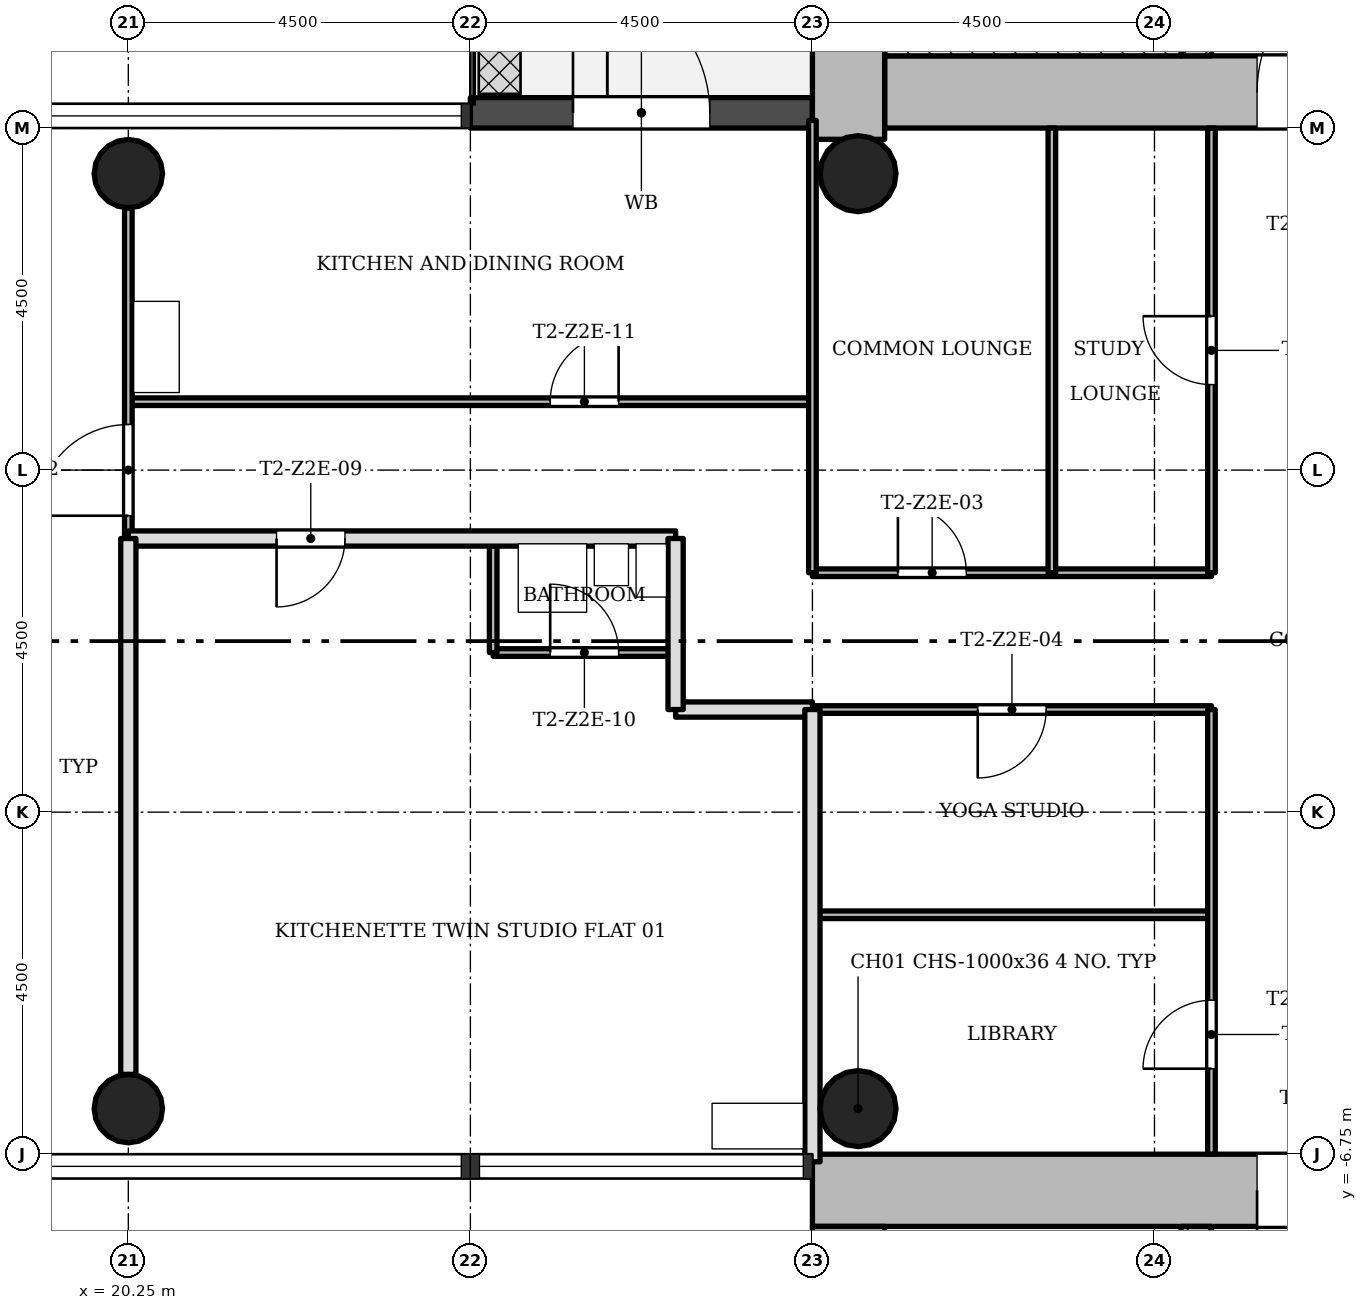
"""IFC4 building model, lengths in metres.
Left out: names, types, materials, properties, quantities, classifications, styles, units other than length and angle.
Written with IfcOpenShell. Run it as: python <this file> out.ifc"""

import sys

from ifc_helpers import new_model, si_unit, direction, frame, frame_2d, origin, origin_2d, place, context, subcontext, project, spatial, rectangle, hollow_circle, extrude, element, fill, save


model = new_model("IFC4")
c1 = context("Model", 3, precision=1e-05, world=origin(), true_north=direction((0.0, 1.0)))
c2 = subcontext(c1, "Body", "Model", "MODEL_VIEW")
j1 = project(units=[si_unit("LENGTHUNIT", "METRE"), si_unit("PLANEANGLEUNIT", "RADIAN")], contexts=[c1])
p1 = place(None, origin())
s1 = spatial("IfcSite", under=j1, at=p1, CompositionType="ELEMENT")
p2 = place(p1, origin())
s2 = spatial("IfcBuilding", under=s1, at=p2, CompositionType="ELEMENT")
p3 = place(p2, frame((0.0, 0.0, 103.8)))
s3 = spatial("IfcBuildingStorey", under=s2, at=p3, CompositionType="ELEMENT", Elevation=103.8)
p4 = place(p3, frame((30.2, 7.225, 0.0), z_axis=(0.0, 0.0, 1.0), x_axis=(1.0, 0.0, 0.0)))
e1 = element("IfcWall", 1, at=p4, inside=s3, PredefinedType="SHEAR", context=c2, shape_type="SweptSolid", body=[
    extrude(rectangle(XDim=12.55, YDim=0.95, at=frame_2d((6.275, 0.0))), origin(), (0.0, 0.0, 1.0), 3.4),
])
p5 = place(p4, frame((4.9, 0.0, 0.0)))
e2 = element("IfcOpeningElement", 2, at=p5, cuts=e1, PredefinedType="OPENING", context=c2, shape_type="SweptSolid", body=[
    extrude(rectangle(XDim=1.8, YDim=2.1, at=frame_2d((0.9, 1.05))), frame((0.0, 0.485, 0.0), z_axis=(0.0, -1.0, 0.0), x_axis=(1.0, 0.0, 0.0)), (0.0, 0.0, 1.0), 0.97),
])
p6 = place(p3, frame((29.725, 15.298, 0.0), z_axis=(0.0, 0.0, 1.0), x_axis=(0.0, -1.0, 0.0)))
e3 = element("IfcWall", 3, at=p6, inside=s3, PredefinedType="SHEAR", context=c2, shape_type="SweptSolid", body=[
    extrude(rectangle(XDim=8.696, YDim=0.95, at=frame_2d((4.348, 0.0))), origin(), (0.0, 0.0, 1.0), 3.4),
])
p7 = place(p3, frame((34.3, 7.7, 0.0), z_axis=(0.0, 0.0, 1.0), x_axis=(0.0, 1.0, 0.0)))
e4 = element("IfcWall", 4, at=p7, inside=s3, PredefinedType="SHEAR", context=c2, shape_type="SweptSolid", body=[
    extrude(rectangle(XDim=7.1, YDim=0.4, at=frame_2d((3.55, 0.0))), origin(), (0.0, 0.0, 1.0), 3.4),
])
p8 = place(p7, frame((0.7, 0.0, 0.0)))
e5 = element("IfcOpeningElement", 5, at=p8, cuts=e4, PredefinedType="OPENING", context=c2, shape_type="SweptSolid", body=[
    extrude(rectangle(XDim=0.9, YDim=2.1, at=frame_2d((0.45, 1.05))), frame((0.0, 0.21, 0.0), z_axis=(0.0, -1.0, 0.0), x_axis=(1.0, 0.0, 0.0)), (0.0, 0.0, 1.0), 0.42),
])
p9 = place(p3, frame((41.8, -7.225, 0.0), z_axis=(0.0, 0.0, 1.0), x_axis=(-1.0, 0.0, 0.0)))
e6 = element("IfcWall", 6, at=p9, inside=s3, PredefinedType="SHEAR", context=c2, shape_type="SweptSolid", body=[
    extrude(rectangle(XDim=12.55, YDim=0.95, at=frame_2d((6.275, 0.0))), origin(), (0.0, 0.0, 1.0), 3.4),
])
p10 = place(p9, frame((4.9, 0.0, 0.0)))
e7 = element("IfcOpeningElement", 7, at=p10, cuts=e6, PredefinedType="OPENING", context=c2, shape_type="SweptSolid", body=[
    extrude(rectangle(XDim=1.8, YDim=2.1, at=frame_2d((0.9, 1.05))), frame((0.0, 0.485, 0.0), z_axis=(0.0, -1.0, 0.0), x_axis=(1.0, 0.0, 0.0)), (0.0, 0.0, 1.0), 0.97),
])
p11 = place(p3, frame((29.725, -7.7, 0.0), z_axis=(0.0, 0.0, 1.0), x_axis=(0.0, -1.0, 0.0)))
e8 = element("IfcWall", 8, at=p11, inside=s3, PredefinedType="SHEAR", context=c2, shape_type="SweptSolid", body=[
    extrude(rectangle(XDim=8.05, YDim=0.95, at=frame_2d((4.025, 0.0))), origin(), (0.0, 0.0, 1.0), 3.4),
])
p12 = place(p3, frame((34.3, -14.8, 0.0), z_axis=(0.0, 0.0, 1.0), x_axis=(0.0, 1.0, 0.0)))
e9 = element("IfcWall", 9, at=p12, inside=s3, PredefinedType="SHEAR", context=c2, shape_type="SweptSolid", body=[
    extrude(rectangle(XDim=7.1, YDim=0.4, at=frame_2d((3.55, 0.0))), origin(), (0.0, 0.0, 1.0), 3.4),
])
p13 = place(p12, frame((5.2, 0.0, 0.0)))
e10 = element("IfcOpeningElement", 10, at=p13, cuts=e9, PredefinedType="OPENING", context=c2, shape_type="SweptSolid", body=[
    extrude(rectangle(XDim=1.1, YDim=2.1, at=frame_2d((0.55, 1.05))), frame((0.0, 0.21, 0.0), z_axis=(0.0, -1.0, 0.0), x_axis=(1.0, 0.0, 0.0)), (0.0, 0.0, 1.0), 0.42),
])
for number, where, z_axis, x_axis in (
    (11, (20.25, 6.15, 0.0), (0.0, 0.0, 1.0), (1.0, 0.0, 0.0)),
    (12, (20.25, -6.15, 0.0), (0.0, 0.0, 1.0), (1.0, 0.0, 0.0)),
):
    element("IfcColumn", number, at=place(p3, frame(where, z_axis=z_axis, x_axis=x_axis)), inside=s3, PredefinedType="COLUMN", context=c2, shape_type="SweptSolid", body=[
        extrude(hollow_circle(Radius=0.45, WallThickness=0.032, at=origin_2d()), origin(), (0.0, 0.0, 1.0), 3.4),
    ])
for number, where, z_axis, x_axis in (
    (13, (29.85, 6.15, 0.0), (0.0, 0.0, 1.0), (1.0, 0.0, 0.0)),
    (14, (29.85, -6.15, 0.0), (0.0, 0.0, 1.0), (1.0, 0.0, 0.0)),
):
    element("IfcColumn", number, at=place(p3, frame(where, z_axis=z_axis, x_axis=x_axis)), inside=s3, PredefinedType="COLUMN", context=c2, shape_type="SweptSolid", body=[
        extrude(hollow_circle(Radius=0.5, WallThickness=0.036, at=origin_2d()), origin(), (0.0, 0.0, 1.0), 3.4),
    ])
p14 = place(p3, frame((29.25, 6.95, -0.02), z_axis=(0.0, 0.0, 1.0), x_axis=(-1.0, 0.0, 0.0)))
e15 = element("IfcWall", 15, at=p14, inside=s3, PredefinedType="STANDARD", context=c2, shape_type="SweptSolid", body=[
    extrude(rectangle(XDim=4.5, YDim=0.4, at=frame_2d((2.25, 0.0))), origin(), (0.0, 0.0, 1.0), 3.12),
])
p15 = place(p14, frame((1.35, 0.0, 0.02)))
e16 = element("IfcOpeningElement", 16, at=p15, cuts=e15, PredefinedType="OPENING", context=c2, shape_type="SweptSolid", body=[
    extrude(rectangle(XDim=1.8, YDim=2.1, at=frame_2d((0.9, 1.05))), frame((0.0, 0.21, 0.0), z_axis=(0.0, -1.0, 0.0), x_axis=(1.0, 0.0, 0.0)), (0.0, 0.0, 1.0), 0.42),
])
p16 = place(p3, frame((34.5, -3.6, 0.0), z_axis=(0.0, 0.0, 1.0), x_axis=(-1.0, 0.0, 0.0)))
e17 = element("IfcWall", 17, at=p16, inside=s3, PredefinedType="PARTITIONING", context=c2, shape_type="SweptSolid", body=[
    extrude(rectangle(XDim=5.25, YDim=0.1, at=frame_2d((2.625, 0.0))), origin(), (0.0, 0.0, 1.0), 3.0),
])
p17 = place(p3, frame((34.5, -0.9, 0.0), z_axis=(0.0, 0.0, 1.0), x_axis=(-1.0, 0.0, 0.0)))
e18 = element("IfcWall", 18, at=p17, inside=s3, PredefinedType="PARTITIONING", context=c2, shape_type="SweptSolid", body=[
    extrude(rectangle(XDim=5.25, YDim=0.1, at=frame_2d((2.625, 0.0))), origin(), (0.0, 0.0, 1.0), 3.0),
])
p18 = place(p17, frame((2.175, 0.0, 0.0)))
e19 = element("IfcOpeningElement", 19, at=p18, cuts=e18, PredefinedType="OPENING", context=c2, shape_type="SweptSolid", body=[
    extrude(rectangle(XDim=0.9, YDim=2.1, at=frame_2d((0.45, 1.05))), frame((0.0, 0.06, 0.0), z_axis=(0.0, -1.0, 0.0), x_axis=(1.0, 0.0, 0.0)), (0.0, 0.0, 1.0), 0.12),
])
p19 = place(p3, frame((29.25, -0.9, 0.0), z_axis=(0.0, 0.0, 1.0), x_axis=(-1.0, 0.0, 0.0)))
e20 = element("IfcWall", 20, at=p19, inside=s3, PredefinedType="SOLIDWALL", context=c2, shape_type="SweptSolid", body=[
    extrude(rectangle(XDim=1.8, YDim=0.2, at=frame_2d((0.9, 0.0))), origin(), (0.0, 0.0, 1.0), 3.0),
])
p20 = place(p3, frame((27.45, -0.15, 0.0), z_axis=(0.0, 0.0, 1.0), x_axis=(-1.0, 0.0, 0.0)))
e21 = element("IfcWall", 21, at=p20, inside=s3, PredefinedType="PARTITIONING", context=c2, shape_type="SweptSolid", body=[
    extrude(rectangle(XDim=2.4, YDim=0.1, at=frame_2d((1.2, 0.0))), origin(), (0.0, 0.0, 1.0), 3.0),
])
p21 = place(p20, frame((0.75, 0.0, 0.0)))
e22 = element("IfcOpeningElement", 22, at=p21, cuts=e21, PredefinedType="OPENING", context=c2, shape_type="SweptSolid", body=[
    extrude(rectangle(XDim=0.9, YDim=2.1, at=frame_2d((0.45, 1.05))), frame((0.0, 0.06, 0.0), z_axis=(0.0, -1.0, 0.0), x_axis=(1.0, 0.0, 0.0)), (0.0, 0.0, 1.0), 0.12),
])
p22 = place(p3, frame((34.5, 0.9, 0.0), z_axis=(0.0, 0.0, 1.0), x_axis=(-1.0, 0.0, 0.0)))
e23 = element("IfcWall", 23, at=p22, inside=s3, PredefinedType="PARTITIONING", context=c2, shape_type="SweptSolid", body=[
    extrude(rectangle(XDim=5.25, YDim=0.1, at=frame_2d((2.625, 0.0))), origin(), (0.0, 0.0, 1.0), 3.0),
])
p23 = place(p22, frame((3.225, 0.0, 0.0)))
e24 = element("IfcOpeningElement", 24, at=p23, cuts=e23, PredefinedType="OPENING", context=c2, shape_type="SweptSolid", body=[
    extrude(rectangle(XDim=0.9, YDim=2.1, at=frame_2d((0.45, 1.05))), frame((0.0, 0.06, 0.0), z_axis=(0.0, -1.0, 0.0), x_axis=(1.0, 0.0, 0.0)), (0.0, 0.0, 1.0), 0.12),
])
p24 = place(p3, frame((27.45, 1.35, 0.0), z_axis=(0.0, 0.0, 1.0), x_axis=(-1.0, 0.0, 0.0)))
e25 = element("IfcWall", 25, at=p24, inside=s3, PredefinedType="SOLIDWALL", context=c2, shape_type="SweptSolid", body=[
    extrude(rectangle(XDim=7.2, YDim=0.2, at=frame_2d((3.6, 0.0))), origin(), (0.0, 0.0, 1.0), 3.0),
])
p25 = place(p24, frame((4.35, 0.0, 0.0)))
e26 = element("IfcOpeningElement", 26, at=p25, cuts=e25, PredefinedType="OPENING", context=c2, shape_type="SweptSolid", body=[
    extrude(rectangle(XDim=0.9, YDim=2.1, at=frame_2d((0.45, 1.05))), frame((0.0, 0.11, 0.0), z_axis=(0.0, -1.0, 0.0), x_axis=(1.0, 0.0, 0.0)), (0.0, 0.0, 1.0), 0.22),
])
p26 = place(p3, frame((29.25, 3.15, 0.0), z_axis=(0.0, 0.0, 1.0), x_axis=(-1.0, 0.0, 0.0)))
e27 = element("IfcWall", 27, at=p26, inside=s3, PredefinedType="PARTITIONING", context=c2, shape_type="SweptSolid", body=[
    extrude(rectangle(XDim=9.0, YDim=0.1, at=frame_2d((4.5, 0.0))), origin(), (0.0, 0.0, 1.0), 3.0),
])
p27 = place(p26, frame((2.55, 0.0, 0.0)))
e28 = element("IfcOpeningElement", 28, at=p27, cuts=e27, PredefinedType="OPENING", context=c2, shape_type="SweptSolid", body=[
    extrude(rectangle(XDim=0.9, YDim=2.1, at=frame_2d((0.45, 1.05))), frame((0.0, 0.06, 0.0), z_axis=(0.0, -1.0, 0.0), x_axis=(1.0, 0.0, 0.0)), (0.0, 0.0, 1.0), 0.12),
])
p28 = place(p3, frame((34.5, -6.75, 0.0), z_axis=(0.0, 0.0, 1.0), x_axis=(0.0, 1.0, 0.0)))
e29 = element("IfcWall", 29, at=p28, inside=s3, PredefinedType="PARTITIONING", context=c2, shape_type="SweptSolid", body=[
    extrude(rectangle(XDim=5.85, YDim=0.1, at=frame_2d((2.925, 0.0))), origin(), (0.0, 0.0, 1.0), 3.0),
])
p29 = place(p28, frame((1.125, 0.0, 0.0)))
e30 = element("IfcOpeningElement", 30, at=p29, cuts=e29, PredefinedType="OPENING", context=c2, shape_type="SweptSolid", body=[
    extrude(rectangle(XDim=0.9, YDim=2.1, at=frame_2d((0.45, 1.05))), frame((0.0, 0.06, 0.0), z_axis=(0.0, -1.0, 0.0), x_axis=(1.0, 0.0, 0.0)), (0.0, 0.0, 1.0), 0.12),
])
p30 = place(p3, frame((34.5, 0.9, 0.0), z_axis=(0.0, 0.0, 1.0), x_axis=(0.0, 1.0, 0.0)))
e31 = element("IfcWall", 31, at=p30, inside=s3, PredefinedType="PARTITIONING", context=c2, shape_type="SweptSolid", body=[
    extrude(rectangle(XDim=5.85, YDim=0.1, at=frame_2d((2.925, 0.0))), origin(), (0.0, 0.0, 1.0), 3.0),
])
p31 = place(p30, frame((2.475, 0.0, 0.0)))
e32 = element("IfcOpeningElement", 32, at=p31, cuts=e31, PredefinedType="OPENING", context=c2, shape_type="SweptSolid", body=[
    extrude(rectangle(XDim=0.9, YDim=2.1, at=frame_2d((0.45, 1.05))), frame((0.0, 0.06, 0.0), z_axis=(0.0, -1.0, 0.0), x_axis=(1.0, 0.0, 0.0)), (0.0, 0.0, 1.0), 0.12),
])
p32 = place(p3, frame((32.4, 0.9, 0.0), z_axis=(0.0, 0.0, 1.0), x_axis=(0.0, 1.0, 0.0)))
e33 = element("IfcWall", 33, at=p32, inside=s3, PredefinedType="PARTITIONING", context=c2, shape_type="SweptSolid", body=[
    extrude(rectangle(XDim=5.85, YDim=0.1, at=frame_2d((2.925, 0.0))), origin(), (0.0, 0.0, 1.0), 3.0),
])
p33 = place(p3, frame((29.25, 0.9, 0.0), z_axis=(0.0, 0.0, 1.0), x_axis=(0.0, 1.0, 0.0)))
e34 = element("IfcWall", 34, at=p33, inside=s3, PredefinedType="PARTITIONING", context=c2, shape_type="SweptSolid", body=[
    extrude(rectangle(XDim=5.95, YDim=0.1, at=frame_2d((2.975, 0.0))), origin(), (0.0, 0.0, 1.0), 3.0),
])
p34 = place(p3, frame((29.25, -6.85, 0.0), z_axis=(0.0, 0.0, 1.0), x_axis=(0.0, 1.0, 0.0)))
e35 = element("IfcWall", 35, at=p34, inside=s3, PredefinedType="SOLIDWALL", context=c2, shape_type="SweptSolid", body=[
    extrude(rectangle(XDim=5.95, YDim=0.2, at=frame_2d((2.975, 0.0))), origin(), (0.0, 0.0, 1.0), 3.0),
])
p35 = place(p3, frame((27.45, -0.9, 0.0), z_axis=(0.0, 0.0, 1.0), x_axis=(0.0, 1.0, 0.0)))
e36 = element("IfcWall", 36, at=p35, inside=s3, PredefinedType="SOLIDWALL", context=c2, shape_type="SweptSolid", body=[
    extrude(rectangle(XDim=2.25, YDim=0.2, at=frame_2d((1.125, 0.0))), origin(), (0.0, 0.0, 1.0), 3.0),
])
p36 = place(p3, frame((25.05, -0.15, 0.0), z_axis=(0.0, 0.0, 1.0), x_axis=(0.0, 1.0, 0.0)))
e37 = element("IfcWall", 37, at=p36, inside=s3, PredefinedType="PARTITIONING", context=c2, shape_type="SweptSolid", body=[
    extrude(rectangle(XDim=1.5, YDim=0.1, at=frame_2d((0.75, 0.0))), origin(), (0.0, 0.0, 1.0), 3.0),
])
p37 = place(p3, frame((20.25, 1.35, 0.0), z_axis=(0.0, 0.0, 1.0), x_axis=(0.0, 1.0, 0.0)))
e38 = element("IfcWall", 38, at=p37, inside=s3, PredefinedType="PARTITIONING", context=c2, shape_type="SweptSolid", body=[
    extrude(rectangle(XDim=4.35, YDim=0.1, at=frame_2d((2.175, 0.0))), origin(), (0.0, 0.0, 1.0), 3.0),
])
p38 = place(p37, frame((0.3, 0.0, 0.0)))
e39 = element("IfcOpeningElement", 39, at=p38, cuts=e38, PredefinedType="OPENING", context=c2, shape_type="SweptSolid", body=[
    extrude(rectangle(XDim=1.2, YDim=2.1, at=frame_2d((0.6, 1.05))), frame((0.0, 0.06, 0.0), z_axis=(0.0, -1.0, 0.0), x_axis=(1.0, 0.0, 0.0)), (0.0, 0.0, 1.0), 0.12),
])
p39 = place(p3, frame((20.25, -5.7, 0.0), z_axis=(0.0, 0.0, 1.0), x_axis=(0.0, 1.0, 0.0)))
e40 = element("IfcWall", 40, at=p39, inside=s3, PredefinedType="SOLIDWALL", context=c2, shape_type="SweptSolid", body=[
    extrude(rectangle(XDim=7.05, YDim=0.2, at=frame_2d((3.525, 0.0))), origin(), (0.0, 0.0, 1.0), 3.0),
])
p40 = place(p3, frame((34.1, 7.825, 0.0), z_axis=(0.0, 0.0, 1.0), x_axis=(-1.0, 0.0, 0.0)))
e41 = element("IfcWall", 41, at=p40, inside=s3, PredefinedType="SHEAR", context=c2, shape_type="SweptSolid", body=[
    extrude(rectangle(XDim=3.9, YDim=0.25, at=frame_2d((1.95, 0.0))), origin(), (0.0, 0.0, 1.0), 3.4),
])
p41 = place(p15, origin())
e42 = element("IfcDoor", 42, at=p41, inside=s3, OperationType="SINGLE_SWING_RIGHT", PredefinedType="DOOR", context=c2, shape_type="SweptSolid", body=[
    extrude(rectangle(XDim=1.8, YDim=2.1, at=frame_2d((0.9, 1.05))), frame((0.0, 0.025, 0.0), z_axis=(0.0, -1.0, 0.0), x_axis=(1.0, 0.0, 0.0)), (0.0, 0.0, 1.0), 0.05),
])
fill(e16, e42)
p42 = place(p31, origin())
e43 = element("IfcDoor", 43, at=p42, inside=s3, OperationType="SINGLE_SWING_LEFT", PredefinedType="DOOR", context=c2, shape_type="SweptSolid", body=[
    extrude(rectangle(XDim=0.9, YDim=2.1, at=frame_2d((0.45, 1.05))), frame((0.0, 0.025, 0.0), z_axis=(0.0, -1.0, 0.0), x_axis=(1.0, 0.0, 0.0)), (0.0, 0.0, 1.0), 0.05),
])
fill(e32, e43)
p43 = place(p23, origin())
e44 = element("IfcDoor", 44, at=p43, inside=s3, OperationType="SINGLE_SWING_RIGHT", PredefinedType="DOOR", context=c2, shape_type="SweptSolid", body=[
    extrude(rectangle(XDim=0.9, YDim=2.1, at=frame_2d((0.45, 1.05))), frame((0.0, 0.025, 0.0), z_axis=(0.0, -1.0, 0.0), x_axis=(1.0, 0.0, 0.0)), (0.0, 0.0, 1.0), 0.05),
])
fill(e24, e44)
p44 = place(p18, origin())
e45 = element("IfcDoor", 45, at=p44, inside=s3, OperationType="SINGLE_SWING_LEFT", PredefinedType="DOOR", context=c2, shape_type="SweptSolid", body=[
    extrude(rectangle(XDim=0.9, YDim=2.1, at=frame_2d((0.45, 1.05))), frame((0.0, 0.025, 0.0), z_axis=(0.0, -1.0, 0.0), x_axis=(1.0, 0.0, 0.0)), (0.0, 0.0, 1.0), 0.05),
])
fill(e19, e45)
p45 = place(p29, origin())
e46 = element("IfcDoor", 46, at=p45, inside=s3, OperationType="SINGLE_SWING_RIGHT", PredefinedType="DOOR", context=c2, shape_type="SweptSolid", body=[
    extrude(rectangle(XDim=0.9, YDim=2.1, at=frame_2d((0.45, 1.05))), frame((0.0, 0.025, 0.0), z_axis=(0.0, -1.0, 0.0), x_axis=(1.0, 0.0, 0.0)), (0.0, 0.0, 1.0), 0.05),
])
fill(e30, e46)
p46 = place(p25, origin())
e47 = element("IfcDoor", 47, at=p46, inside=s3, OperationType="SINGLE_SWING_LEFT", PredefinedType="DOOR", context=c2, shape_type="SweptSolid", body=[
    extrude(rectangle(XDim=0.9, YDim=2.1, at=frame_2d((0.45, 1.05))), frame((0.0, 0.025, 0.0), z_axis=(0.0, -1.0, 0.0), x_axis=(1.0, 0.0, 0.0)), (0.0, 0.0, 1.0), 0.05),
])
fill(e26, e47)
p47 = place(p21, origin())
e48 = element("IfcDoor", 48, at=p47, inside=s3, OperationType="SINGLE_SWING_RIGHT", PredefinedType="DOOR", context=c2, shape_type="SweptSolid", body=[
    extrude(rectangle(XDim=0.9, YDim=2.1, at=frame_2d((0.45, 1.05))), frame((0.0, 0.025, 0.0), z_axis=(0.0, -1.0, 0.0), x_axis=(1.0, 0.0, 0.0)), (0.0, 0.0, 1.0), 0.05),
])
fill(e22, e48)
p48 = place(p27, origin())
e49 = element("IfcDoor", 49, at=p48, inside=s3, OperationType="SINGLE_SWING_LEFT", PredefinedType="DOOR", context=c2, shape_type="SweptSolid", body=[
    extrude(rectangle(XDim=0.9, YDim=2.1, at=frame_2d((0.45, 1.05))), frame((0.0, 0.025, 0.0), z_axis=(0.0, -1.0, 0.0), x_axis=(1.0, 0.0, 0.0)), (0.0, 0.0, 1.0), 0.05),
])
fill(e28, e49)
p49 = place(p38, origin())
e50 = element("IfcDoor", 50, at=p49, inside=s3, OperationType="SINGLE_SWING_RIGHT", PredefinedType="DOOR", context=c2, shape_type="SweptSolid", body=[
    extrude(rectangle(XDim=1.2, YDim=2.1, at=frame_2d((0.6, 1.05))), frame((0.0, 0.025, 0.0), z_axis=(0.0, -1.0, 0.0), x_axis=(1.0, 0.0, 0.0)), (0.0, 0.0, 1.0), 0.05),
])
fill(e39, e50)
p50 = place(p5, origin())
e51 = element("IfcDoor", 51, at=p50, inside=s3, OperationType="SINGLE_SWING_LEFT", PredefinedType="DOOR", context=c2, shape_type="SweptSolid", body=[
    extrude(rectangle(XDim=1.8, YDim=2.1, at=frame_2d((0.9, 1.05))), frame((0.0, 0.025, 0.0), z_axis=(0.0, -1.0, 0.0), x_axis=(1.0, 0.0, 0.0)), (0.0, 0.0, 1.0), 0.05),
])
fill(e2, e51)
p51 = place(p10, origin())
e52 = element("IfcDoor", 52, at=p51, inside=s3, OperationType="SINGLE_SWING_LEFT", PredefinedType="DOOR", context=c2, shape_type="SweptSolid", body=[
    extrude(rectangle(XDim=1.8, YDim=2.1, at=frame_2d((0.9, 1.05))), frame((0.0, 0.025, 0.0), z_axis=(0.0, -1.0, 0.0), x_axis=(1.0, 0.0, 0.0)), (0.0, 0.0, 1.0), 0.05),
])
fill(e7, e52)
save(model, sys.argv[1])
